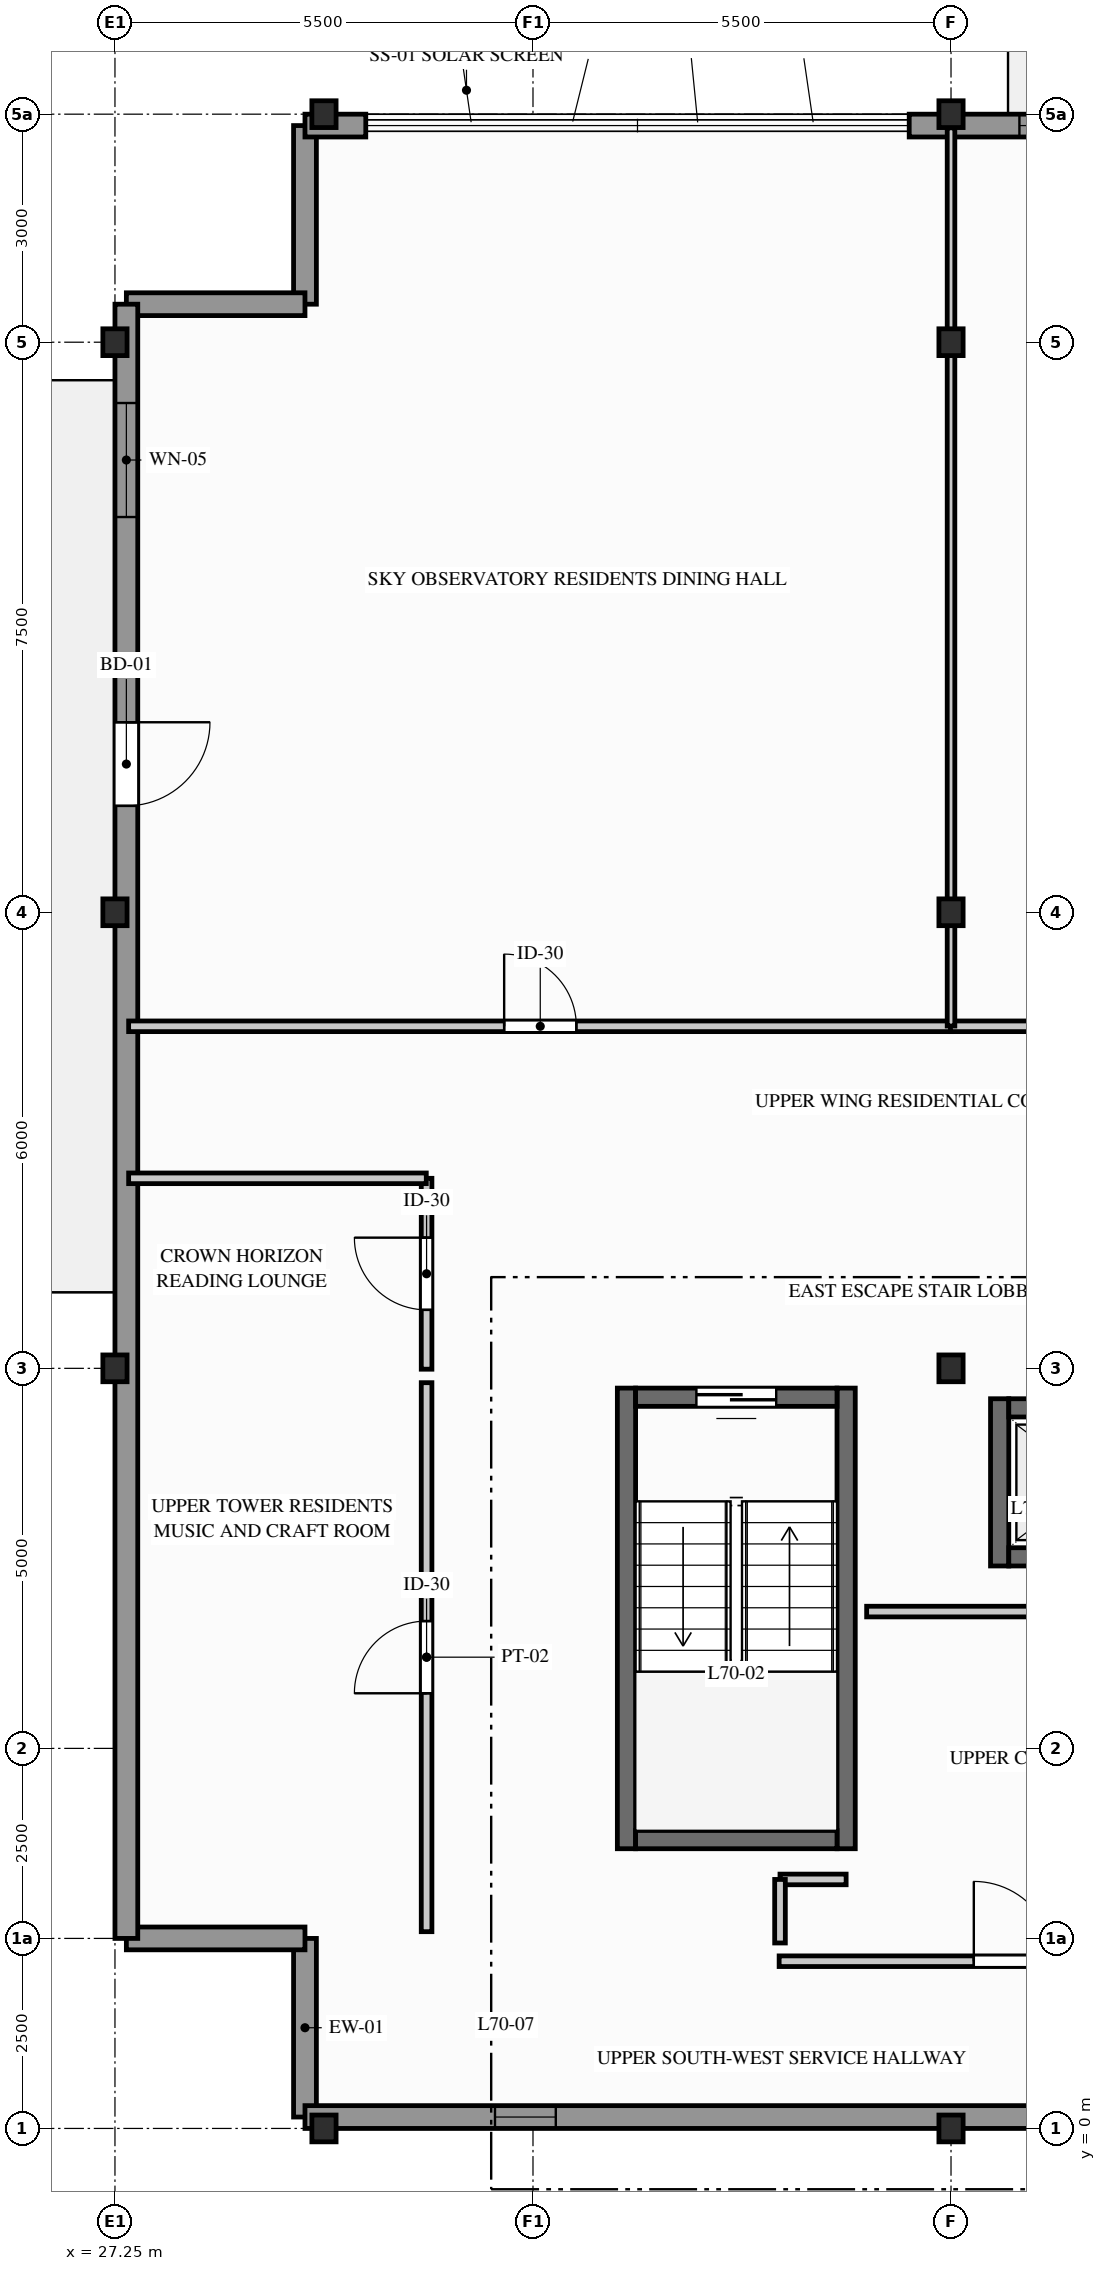
"""IFC4 building model, lengths in metres.
Left out: names, types, materials, properties, quantities, classifications, styles, units other than length and angle.
Written with IfcOpenShell. Run it as: python <this file> out.ifc"""

import sys

from ifc_helpers import new_model, si_unit, direction, frame, frame_2d, origin, origin_2d, place, context, subcontext, project, spatial, rectangle, i_section, extrude, element, fill, save


model = new_model("IFC4")
c1 = context("Model", 3, precision=1e-05, world=origin(), true_north=direction((0.0, 1.0)))
c2 = subcontext(c1, "Body", "Model", "MODEL_VIEW")
j1 = project(units=[si_unit("LENGTHUNIT", "METRE"), si_unit("PLANEANGLEUNIT", "RADIAN")], contexts=[c1])
p1 = place(None, origin())
s1 = spatial("IfcSite", under=j1, at=p1, CompositionType="ELEMENT")
p2 = place(p1, origin())
s2 = spatial("IfcBuilding", under=s1, at=p2, CompositionType="ELEMENT")
p3 = place(p2, frame((0.0, 0.0, 230.4)))
s3 = spatial("IfcBuildingStorey", under=s2, at=p3, CompositionType="ELEMENT", Elevation=230.4)
for number, where, z_axis, x_axis in (
    (1, (27.25, 10.0, 0.0), (0.0, 0.0, 1.0), (1.0, 0.0, 0.0)),
    (2, (27.25, 16.0, 0.0), (0.0, 0.0, 1.0), (1.0, 0.0, 0.0)),
    (3, (27.25, 23.5, 0.0), (0.0, 0.0, 1.0), (1.0, 0.0, 0.0)),
    (4, (30.0, 0.0, 0.0), (0.0, 0.0, 1.0), (1.0, 0.0, 0.0)),
    (5, (30.0, 26.5, 0.0), (0.0, 0.0, 1.0), (1.0, 0.0, 0.0)),
    (6, (38.25, 0.0, 0.0), (0.0, 0.0, 1.0), (1.0, 0.0, 0.0)),
    (7, (38.25, 10.0, 0.0), (0.0, 0.0, 1.0), (1.0, 0.0, 0.0)),
    (8, (38.25, 16.0, 0.0), (0.0, 0.0, 1.0), (1.0, 0.0, 0.0)),
    (9, (38.25, 23.5, 0.0), (0.0, 0.0, 1.0), (1.0, 0.0, 0.0)),
    (10, (38.25, 26.5, 0.0), (0.0, 0.0, 1.0), (1.0, 0.0, 0.0)),
):
    element("IfcColumn", number, at=place(p3, frame(where, z_axis=z_axis, x_axis=x_axis)), inside=s3, PredefinedType="COLUMN", context=c2, shape_type="SweptSolid", body=[
        extrude(i_section(OverallWidth=0.318, OverallDepth=0.353, WebThickness=0.023, FlangeThickness=0.038, FilletRadius=0.015, at=origin_2d()), origin(), (0.0, 0.0, 1.0), 3.1),
    ])
for number, where, z_axis, x_axis in (
    (11, (29.75, 2.5, 0.0), (0.0, 0.0, 1.0), (0.0, -1.0, 0.0)),
    (12, (27.4, 2.5, 0.0), (0.0, 0.0, 1.0), (1.0, 0.0, 0.0)),
    (13, (29.75, 26.35, 0.0), (0.0, 0.0, 1.0), (0.0, -1.0, 0.0)),
    (14, (29.75, 24.0, 0.0), (0.0, 0.0, 1.0), (-1.0, 0.0, 0.0)),
):
    element("IfcWall", number, at=place(p3, frame(where, z_axis=z_axis, x_axis=x_axis)), inside=s3, PredefinedType="STANDARD", context=c2, shape_type="SweptSolid", body=[
        extrude(rectangle(XDim=2.35, YDim=0.3, at=frame_2d((1.175, 0.0))), origin(), (0.0, 0.0, 1.0), 2.89),
    ])
p4 = place(p3, frame((29.75, 0.15, 0.0), z_axis=(0.0, 0.0, 1.0), x_axis=(1.0, 0.0, 0.0)))
e15 = element("IfcWall", 15, at=p4, inside=s3, PredefinedType="STANDARD", context=c2, shape_type="SweptSolid", body=[
    extrude(rectangle(XDim=27.75, YDim=0.3, at=frame_2d((13.875, 0.0))), origin(), (0.0, 0.0, 1.0), 2.332),
])
p5 = place(p4, frame((2.5, 0.0, 0.712)))
e16 = element("IfcOpeningElement", 16, at=p5, cuts=e15, PredefinedType="OPENING", context=c2, shape_type="SweptSolid", body=[
    extrude(rectangle(XDim=0.8, YDim=1.4, at=frame_2d((0.4, 0.7))), frame((0.0, 0.16, 0.0), z_axis=(0.0, -1.0, 0.0), x_axis=(1.0, 0.0, 0.0)), (0.0, 0.0, 1.0), 0.32),
])
p6 = place(p4, frame((19.95, 0.0, 0.312)))
e17 = element("IfcOpeningElement", 17, at=p6, cuts=e15, PredefinedType="OPENING", context=c2, shape_type="SweptSolid", body=[
    extrude(rectangle(XDim=1.5, YDim=1.8, at=frame_2d((0.75, 0.9))), frame((0.0, 0.16, 0.0), z_axis=(0.0, -1.0, 0.0), x_axis=(1.0, 0.0, 0.0)), (0.0, 0.0, 1.0), 0.32),
])
p7 = place(p3, frame((29.75, 26.35, 0.0), z_axis=(0.0, 0.0, 1.0), x_axis=(1.0, 0.0, 0.0)))
e18 = element("IfcWall", 18, at=p7, inside=s3, PredefinedType="STANDARD", context=c2, shape_type="SweptSolid", body=[
    extrude(rectangle(XDim=0.8, YDim=0.3, at=frame_2d((0.4, 0.0))), origin(), (0.0, 0.0, 1.0), 2.89),
])
p8 = place(p3, frame((37.7, 26.35, 0.0), z_axis=(0.0, 0.0, 1.0), x_axis=(1.0, 0.0, 0.0)))
e19 = element("IfcWall", 19, at=p8, inside=s3, PredefinedType="STANDARD", context=c2, shape_type="SweptSolid", body=[
    extrude(rectangle(XDim=10.85, YDim=0.3, at=frame_2d((5.425, 0.0))), origin(), (0.0, 0.0, 1.0), 2.332),
])
p9 = place(p8, frame((5.677, 0.0, 0.0)))
e20 = element("IfcOpeningElement", 20, at=p9, cuts=e19, PredefinedType="OPENING", context=c2, shape_type="SweptSolid", body=[
    extrude(rectangle(XDim=1.25, YDim=2.2, at=frame_2d((0.625, 1.1))), frame((0.0, 0.16, 0.0), z_axis=(0.0, -1.0, 0.0), x_axis=(1.0, 0.0, 0.0)), (0.0, 0.0, 1.0), 0.32),
])
p10 = place(p8, frame((1.45, 0.0, 0.512)))
e21 = element("IfcOpeningElement", 21, at=p10, cuts=e19, PredefinedType="OPENING", context=c2, shape_type="SweptSolid", body=[
    extrude(rectangle(XDim=1.2, YDim=1.6, at=frame_2d((0.6, 0.8))), frame((0.0, 0.16, 0.0), z_axis=(0.0, -1.0, 0.0), x_axis=(1.0, 0.0, 0.0)), (0.0, 0.0, 1.0), 0.32),
])
p11 = place(p3, frame((27.4, 24.0, 0.0), z_axis=(0.0, 0.0, 1.0), x_axis=(0.0, -1.0, 0.0)))
e22 = element("IfcWall", 22, at=p11, inside=s3, PredefinedType="STANDARD", context=c2, shape_type="SweptSolid", body=[
    extrude(rectangle(XDim=21.5, YDim=0.3, at=frame_2d((10.75, 0.0))), origin(), (0.0, 0.0, 1.0), 2.332),
])
p12 = place(p11, frame((5.5, 0.0, 0.0)))
e23 = element("IfcOpeningElement", 23, at=p12, cuts=e22, PredefinedType="OPENING", context=c2, shape_type="SweptSolid", body=[
    extrude(rectangle(XDim=1.1, YDim=2.2, at=frame_2d((0.55, 1.1))), frame((0.0, 0.16, 0.0), z_axis=(0.0, -1.0, 0.0), x_axis=(1.0, 0.0, 0.0)), (0.0, 0.0, 1.0), 0.32),
])
p13 = place(p11, frame((1.3, 0.0, 0.312)))
e24 = element("IfcOpeningElement", 24, at=p13, cuts=e22, PredefinedType="OPENING", context=c2, shape_type="SweptSolid", body=[
    extrude(rectangle(XDim=1.5, YDim=1.8, at=frame_2d((0.75, 0.9))), frame((0.0, 0.16, 0.0), z_axis=(0.0, -1.0, 0.0), x_axis=(1.0, 0.0, 0.0)), (0.0, 0.0, 1.0), 0.32),
])
for number, where, z_axis, x_axis in (
    (25, (33.98, 3.68, 0.0), (0.0, 0.0, 1.0), (0.0, 1.0, 0.0)),
    (26, (36.87, 3.68, 0.0), (0.0, 0.0, 1.0), (0.0, 1.0, 0.0)),
):
    element("IfcWall", number, at=place(p3, frame(where, z_axis=z_axis, x_axis=x_axis)), inside=s3, PredefinedType="SHEAR", context=c2, shape_type="SweptSolid", body=[
        extrude(rectangle(XDim=6.06, YDim=0.24, at=frame_2d((3.03, 0.0))), origin(), (0.0, 0.0, 1.0), 2.89),
    ])
p14 = place(p3, frame((34.1, 3.8, 0.0), z_axis=(0.0, 0.0, 1.0), x_axis=(1.0, 0.0, 0.0)))
e27 = element("IfcWall", 27, at=p14, inside=s3, PredefinedType="SHEAR", context=c2, shape_type="SweptSolid", body=[
    extrude(rectangle(XDim=2.65, YDim=0.24, at=frame_2d((1.325, 0.0))), origin(), (0.0, 0.0, 1.0), 2.89),
])
p15 = place(p3, frame((36.75, 9.62, 0.0), z_axis=(0.0, 0.0, 1.0), x_axis=(-1.0, 0.0, 0.0)))
e28 = element("IfcWall", 28, at=p15, inside=s3, PredefinedType="SHEAR", context=c2, shape_type="SweptSolid", body=[
    extrude(rectangle(XDim=2.65, YDim=0.24, at=frame_2d((1.325, 0.0))), origin(), (0.0, 0.0, 1.0), 2.89),
])
p16 = place(p15, frame((0.8, 0.0, 0.0)))
e29 = element("IfcOpeningElement", 29, at=p16, cuts=e28, PredefinedType="OPENING", context=c2, shape_type="SweptSolid", body=[
    extrude(rectangle(XDim=1.05, YDim=2.06, at=frame_2d((0.525, 1.03))), frame((0.0, 0.13, 0.0), z_axis=(0.0, -1.0, 0.0), x_axis=(1.0, 0.0, 0.0)), (0.0, 0.0, 1.0), 0.26),
])
p17 = place(p3, frame((38.89, 7.4, 0.0), z_axis=(0.0, 0.0, 1.0), x_axis=(0.0, 1.0, 0.0)))
e30 = element("IfcWall", 30, at=p17, inside=s3, PredefinedType="SHEAR", context=c2, shape_type="SweptSolid", body=[
    extrude(rectangle(XDim=2.2, YDim=0.24, at=frame_2d((1.1, 0.0))), origin(), (0.0, 0.0, 1.0), 2.89),
])
p18 = place(p3, frame((39.01, 7.52, 0.0), z_axis=(0.0, 0.0, 1.0), x_axis=(1.0, 0.0, 0.0)))
e31 = element("IfcWall", 31, at=p18, inside=s3, PredefinedType="SHEAR", context=c2, shape_type="SweptSolid", body=[
    extrude(rectangle(XDim=2.22, YDim=0.24, at=frame_2d((1.11, 0.0))), origin(), (0.0, 0.0, 1.0), 2.89),
])
p19 = place(p3, frame((39.01, 9.48, 0.0), z_axis=(0.0, 0.0, 1.0), x_axis=(1.0, 0.0, 0.0)))
e32 = element("IfcWall", 32, at=p19, inside=s3, PredefinedType="SHEAR", context=c2, shape_type="SweptSolid", body=[
    extrude(rectangle(XDim=2.22, YDim=0.24, at=frame_2d((1.11, 0.0))), origin(), (0.0, 0.0, 1.0), 2.89),
])
p20 = place(p19, frame((0.56, 0.0, 0.0)))
e33 = element("IfcOpeningElement", 33, at=p20, cuts=e32, PredefinedType="OPENING", context=c2, shape_type="SweptSolid", body=[
    extrude(rectangle(XDim=1.1, YDim=2.06, at=frame_2d((0.55, 1.03))), frame((0.0, 0.13, 0.0), z_axis=(0.0, -1.0, 0.0), x_axis=(1.0, 0.0, 0.0)), (0.0, 0.0, 1.0), 0.26),
])
p21 = place(p3, frame((31.35, 2.589, 0.0), z_axis=(0.0, 0.0, 1.0), x_axis=(0.0, 1.0, 0.0)))
e34 = element("IfcWall", 34, at=p21, inside=s3, PredefinedType="PARTITIONING", context=c2, shape_type="SweptSolid", body=[
    extrude(rectangle(XDim=7.223, YDim=0.14, at=frame_2d((3.611, 0.0))), origin(), (0.0, 0.0, 1.0), 2.89),
])
p22 = place(p21, frame((3.136, 0.0, 0.0)))
e35 = element("IfcOpeningElement", 35, at=p22, cuts=e34, PredefinedType="OPENING", context=c2, shape_type="SweptSolid", body=[
    extrude(rectangle(XDim=0.95, YDim=2.05, at=frame_2d((0.475, 1.025))), frame((0.0, 0.08, 0.0), z_axis=(0.0, -1.0, 0.0), x_axis=(1.0, 0.0, 0.0)), (0.0, 0.0, 1.0), 0.16),
])
p23 = place(p3, frame((31.35, 9.989, 0.0), z_axis=(0.0, 0.0, 1.0), x_axis=(0.0, 1.0, 0.0)))
e36 = element("IfcWall", 36, at=p23, inside=s3, PredefinedType="PARTITIONING", context=c2, shape_type="SweptSolid", body=[
    extrude(rectangle(XDim=2.511, YDim=0.14, at=frame_2d((1.256, 0.0))), origin(), (0.0, 0.0, 1.0), 2.326),
])
p24 = place(p23, frame((0.781, 0.0, 0.0)))
e37 = element("IfcOpeningElement", 37, at=p24, cuts=e36, PredefinedType="OPENING", context=c2, shape_type="SweptSolid", body=[
    extrude(rectangle(XDim=0.95, YDim=2.05, at=frame_2d((0.475, 1.025))), frame((0.0, 0.08, 0.0), z_axis=(0.0, -1.0, 0.0), x_axis=(1.0, 0.0, 0.0)), (0.0, 0.0, 1.0), 0.16),
])
p25 = place(p3, frame((35.989, 2.2, 0.0), z_axis=(0.0, 0.0, 1.0), x_axis=(1.0, 0.0, 0.0)))
e38 = element("IfcWall", 38, at=p25, inside=s3, PredefinedType="PARTITIONING", context=c2, shape_type="SweptSolid", body=[
    extrude(rectangle(XDim=6.173, YDim=0.14, at=frame_2d((3.086, 0.0))), origin(), (0.0, 0.0, 1.0), 2.326),
])
p26 = place(p25, frame((2.561, 0.0, 0.0)))
e39 = element("IfcOpeningElement", 39, at=p26, cuts=e38, PredefinedType="OPENING", context=c2, shape_type="SweptSolid", body=[
    extrude(rectangle(XDim=1.05, YDim=2.06, at=frame_2d((0.525, 1.03))), frame((0.0, 0.08, 0.0), z_axis=(0.0, -1.0, 0.0), x_axis=(1.0, 0.0, 0.0)), (0.0, 0.0, 1.0), 0.16),
])
p27 = place(p3, frame((27.43, 12.5, 0.0), z_axis=(0.0, 0.0, 1.0), x_axis=(1.0, 0.0, 0.0)))
e40 = element("IfcWall", 40, at=p27, inside=s3, PredefinedType="PARTITIONING", context=c2, shape_type="SweptSolid", body=[
    extrude(rectangle(XDim=3.916, YDim=0.14, at=frame_2d((1.958, 0.0))), origin(), (0.0, 0.0, 1.0), 2.89),
])
p28 = place(p3, frame((27.43, 14.5, 0.0), z_axis=(0.0, 0.0, 1.0), x_axis=(1.0, 0.0, 0.0)))
e41 = element("IfcWall", 41, at=p28, inside=s3, PredefinedType="PARTITIONING", context=c2, shape_type="SweptSolid", body=[
    extrude(rectangle(XDim=10.831, YDim=0.14, at=frame_2d((5.416, 0.0))), origin(), (0.0, 0.0, 1.0), 2.326),
])
p29 = place(p28, frame((4.941, 0.0, 0.0)))
e42 = element("IfcOpeningElement", 42, at=p29, cuts=e41, PredefinedType="OPENING", context=c2, shape_type="SweptSolid", body=[
    extrude(rectangle(XDim=0.95, YDim=2.05, at=frame_2d((0.475, 1.025))), frame((0.0, 0.08, 0.0), z_axis=(0.0, -1.0, 0.0), x_axis=(1.0, 0.0, 0.0)), (0.0, 0.0, 1.0), 0.16),
])
p30 = place(p3, frame((38.243, 14.5, 0.0), z_axis=(0.0, 0.0, 1.0), x_axis=(1.0, 0.0, 0.0)))
e43 = element("IfcWall", 43, at=p30, inside=s3, PredefinedType="PARTITIONING", context=c2, shape_type="SweptSolid", body=[
    extrude(rectangle(XDim=9.769, YDim=0.14, at=frame_2d((4.884, 0.0))), origin(), (0.0, 0.0, 1.0), 2.326),
])
p31 = place(p30, frame((4.409, 0.0, 0.0)))
e44 = element("IfcOpeningElement", 44, at=p31, cuts=e43, PredefinedType="OPENING", context=c2, shape_type="SweptSolid", body=[
    extrude(rectangle(XDim=0.95, YDim=2.05, at=frame_2d((0.475, 1.025))), frame((0.0, 0.08, 0.0), z_axis=(0.0, -1.0, 0.0), x_axis=(1.0, 0.0, 0.0)), (0.0, 0.0, 1.0), 0.16),
])
p32 = place(p3, frame((38.25, 14.504, 0.0), z_axis=(0.0, 0.0, 1.0), x_axis=(0.0, 1.0, 0.0)))
e45 = element("IfcWall", 45, at=p32, inside=s3, PredefinedType="PARTITIONING", context=c2, shape_type="SweptSolid", body=[
    extrude(rectangle(XDim=11.816, YDim=0.1, at=frame_2d((5.908, 0.0))), origin(), (0.0, 0.0, 1.0), 2.326),
])
p33 = place(p3, frame((37.14, 6.8, 0.0), z_axis=(0.0, 0.0, 1.0), x_axis=(1.0, 0.0, 0.0)))
e46 = element("IfcWall", 46, at=p33, inside=s3, PredefinedType="PARTITIONING", context=c2, shape_type="SweptSolid", body=[
    extrude(rectangle(XDim=4.92, YDim=0.14, at=frame_2d((2.46, 0.0))), origin(), (0.0, 0.0, 1.0), 2.326),
])
p34 = place(p3, frame((36.0, 3.276, 0.0), z_axis=(0.0, 0.0, 1.0), x_axis=(1.0, 0.0, 0.0)))
e47 = element("IfcWall", 47, at=p34, inside=s3, PredefinedType="PARTITIONING", context=c2, shape_type="SweptSolid", body=[
    extrude(rectangle(XDim=0.87, YDim=0.14, at=frame_2d((0.435, 0.0))), origin(), (0.0, 0.0, 1.0), 2.89),
])
p35 = place(p3, frame((36.0, 2.44, 0.0), z_axis=(0.0, 0.0, 1.0), x_axis=(0.0, 1.0, 0.0)))
e48 = element("IfcWall", 48, at=p35, inside=s3, PredefinedType="PARTITIONING", context=c2, shape_type="SweptSolid", body=[
    extrude(rectangle(XDim=0.836, YDim=0.14, at=frame_2d((0.418, 0.0))), origin(), (0.0, 0.0, 1.0), 2.89),
])
p36 = place(p5, origin())
e49 = element("IfcWindow", 49, at=p36, inside=s3, PartitioningType="SINGLE_PANEL", PredefinedType="WINDOW", context=c2, shape_type="SweptSolid", body=[
    extrude(rectangle(XDim=0.8, YDim=1.4, at=frame_2d((0.4, 0.7))), frame((0.0, 0.03, 0.0), z_axis=(0.0, -1.0, 0.0), x_axis=(1.0, 0.0, 0.0)), (0.0, 0.0, 1.0), 0.06),
])
fill(e16, e49)
p37 = place(p10, origin())
e50 = element("IfcWindow", 50, at=p37, inside=s3, PartitioningType="SINGLE_PANEL", PredefinedType="WINDOW", context=c2, shape_type="SweptSolid", body=[
    extrude(rectangle(XDim=1.2, YDim=1.6, at=frame_2d((0.6, 0.8))), frame((0.0, 0.03, 0.0), z_axis=(0.0, -1.0, 0.0), x_axis=(1.0, 0.0, 0.0)), (0.0, 0.0, 1.0), 0.06),
])
fill(e21, e50)
p38 = place(p12, origin())
e51 = element("IfcDoor", 51, at=p38, inside=s3, OperationType="SINGLE_SWING_LEFT", PredefinedType="DOOR", context=c2, shape_type="SweptSolid", body=[
    extrude(rectangle(XDim=1.1, YDim=2.2, at=frame_2d((0.55, 1.1))), frame((0.0, 0.025, 0.0), z_axis=(0.0, -1.0, 0.0), x_axis=(1.0, 0.0, 0.0)), (0.0, 0.0, 1.0), 0.05),
])
fill(e23, e51)
p39 = place(p13, origin())
e52 = element("IfcWindow", 52, at=p39, inside=s3, PartitioningType="SINGLE_PANEL", PredefinedType="WINDOW", context=c2, shape_type="SweptSolid", body=[
    extrude(rectangle(XDim=1.5, YDim=1.8, at=frame_2d((0.75, 0.9))), frame((0.0, 0.03, 0.0), z_axis=(0.0, -1.0, 0.0), x_axis=(1.0, 0.0, 0.0)), (0.0, 0.0, 1.0), 0.06),
])
fill(e24, e52)
p40 = place(p16, origin())
e53 = element("IfcDoor", 53, at=p40, inside=s3, OperationType="SINGLE_SWING_LEFT", PredefinedType="DOOR", context=c2, shape_type="SweptSolid", body=[
    extrude(rectangle(XDim=1.05, YDim=2.06, at=frame_2d((0.525, 1.03))), frame((0.0, 0.025, 0.0), z_axis=(0.0, -1.0, 0.0), x_axis=(1.0, 0.0, 0.0)), (0.0, 0.0, 1.0), 0.05),
])
fill(e29, e53)
p41 = place(p22, origin())
e54 = element("IfcDoor", 54, at=p41, inside=s3, OperationType="SINGLE_SWING_LEFT", PredefinedType="DOOR", context=c2, shape_type="SweptSolid", body=[
    extrude(rectangle(XDim=0.95, YDim=2.05, at=frame_2d((0.475, 1.025))), frame((0.0, 0.025, 0.0), z_axis=(0.0, -1.0, 0.0), x_axis=(1.0, 0.0, 0.0)), (0.0, 0.0, 1.0), 0.05),
])
fill(e35, e54)
p42 = place(p24, origin())
e55 = element("IfcDoor", 55, at=p42, inside=s3, OperationType="SINGLE_SWING_RIGHT", PredefinedType="DOOR", context=c2, shape_type="SweptSolid", body=[
    extrude(rectangle(XDim=0.95, YDim=2.05, at=frame_2d((0.475, 1.025))), frame((0.0, 0.025, 0.0), z_axis=(0.0, -1.0, 0.0), x_axis=(1.0, 0.0, 0.0)), (0.0, 0.0, 1.0), 0.05),
])
fill(e37, e55)
p43 = place(p26, origin())
e56 = element("IfcDoor", 56, at=p43, inside=s3, OperationType="SINGLE_SWING_LEFT", PredefinedType="DOOR", context=c2, shape_type="SweptSolid", body=[
    extrude(rectangle(XDim=1.05, YDim=2.06, at=frame_2d((0.525, 1.03))), frame((0.0, 0.025, 0.0), z_axis=(0.0, -1.0, 0.0), x_axis=(1.0, 0.0, 0.0)), (0.0, 0.0, 1.0), 0.05),
])
fill(e39, e56)
p44 = place(p29, origin())
e57 = element("IfcDoor", 57, at=p44, inside=s3, OperationType="SINGLE_SWING_LEFT", PredefinedType="DOOR", context=c2, shape_type="SweptSolid", body=[
    extrude(rectangle(XDim=0.95, YDim=2.05, at=frame_2d((0.475, 1.025))), frame((0.0, 0.025, 0.0), z_axis=(0.0, -1.0, 0.0), x_axis=(1.0, 0.0, 0.0)), (0.0, 0.0, 1.0), 0.05),
])
fill(e42, e57)
save(model, sys.argv[1])
